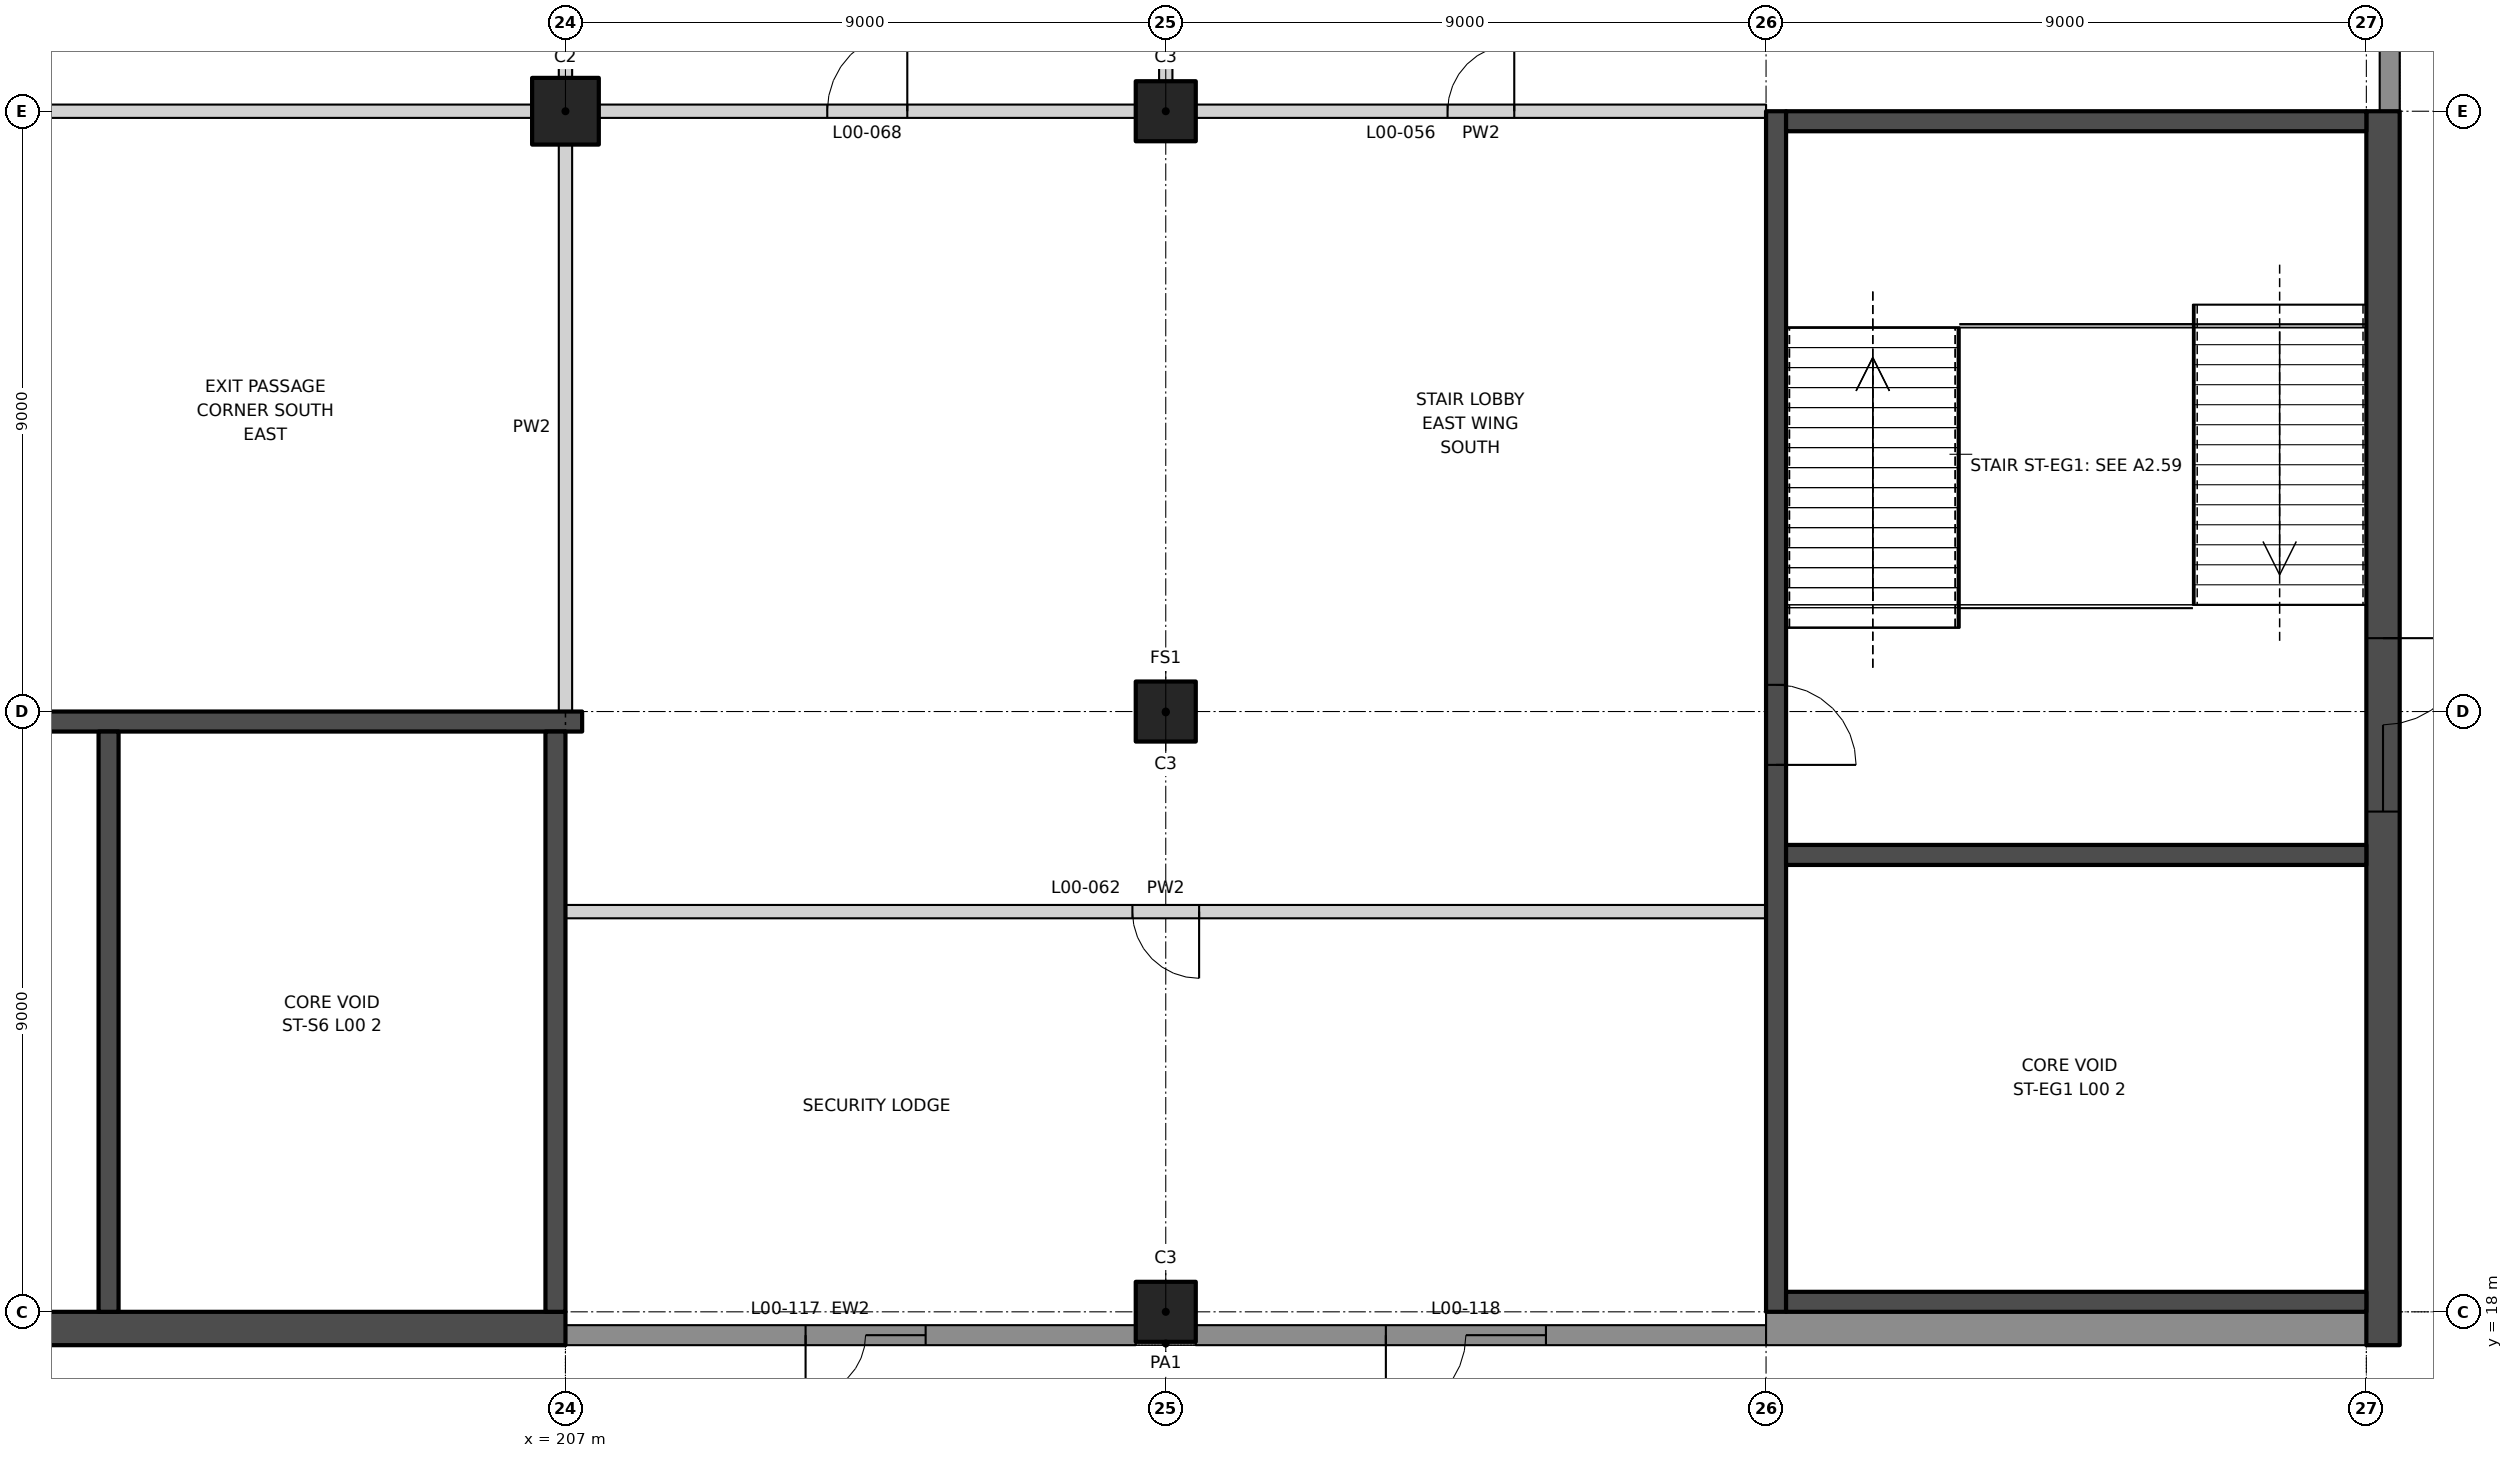
"""IFC4 building model, lengths in metres.
Left out: names, types, materials, properties, quantities, classifications, styles, units other than length and angle.
Written with IfcOpenShell. Run it as: python <this file> out.ifc"""

import sys

from ifc_helpers import new_model, si_unit, direction, frame, frame_2d, origin, origin_2d, place, context, subcontext, project, spatial, rectangle, extrude, element, fill, save


model = new_model("IFC4")
c1 = context("Model", 3, precision=1e-05, world=origin(), true_north=direction((0.0, 1.0)))
c2 = subcontext(c1, "Body", "Model", "MODEL_VIEW")
j1 = project(units=[si_unit("LENGTHUNIT", "METRE"), si_unit("PLANEANGLEUNIT", "RADIAN")], contexts=[c1])
p1 = place(None, origin())
s1 = spatial("IfcSite", under=j1, at=p1, CompositionType="ELEMENT")
p2 = place(p1, origin())
s2 = spatial("IfcBuilding", under=s1, at=p2, CompositionType="ELEMENT")
p3 = place(p2, origin())
s3 = spatial("IfcBuildingStorey", under=s2, at=p3, CompositionType="ELEMENT", Elevation=0.0)
p4 = place(p3, frame((207.0, 36.0, 0.0), z_axis=(0.0, 0.0, 1.0), x_axis=(1.0, 0.0, 0.0)))
e1 = element("IfcColumn", 1, at=p4, inside=s3, PredefinedType="COLUMN", context=c2, shape_type="SweptSolid", body=[
    extrude(rectangle(XDim=1.0, YDim=1.0, at=origin_2d()), origin(), (0.0, 0.0, 1.0), 7.0),
])
for number, where, z_axis, x_axis in (
    (2, (216.0, 18.0, 0.0), (0.0, 0.0, 1.0), (1.0, 0.0, 0.0)),
    (3, (216.0, 27.0, 0.0), (0.0, 0.0, 1.0), (1.0, 0.0, 0.0)),
    (4, (216.0, 36.0, 0.0), (0.0, 0.0, 1.0), (1.0, 0.0, 0.0)),
):
    element("IfcColumn", number, at=place(p3, frame(where, z_axis=z_axis, x_axis=x_axis)), inside=s3, PredefinedType="COLUMN", context=c2, shape_type="SweptSolid", body=[
        extrude(rectangle(XDim=0.9, YDim=0.9, at=origin_2d()), origin(), (0.0, 0.0, 1.0), 7.0),
    ])
p5 = place(p3, frame((207.0, 24.0, 0.0), z_axis=(0.0, 0.0, 1.0), x_axis=(1.0, 0.0, 0.0)))
e5 = element("IfcWall", 5, at=p5, inside=s3, PredefinedType="PARTITIONING", context=c2, shape_type="SweptSolid", body=[
    extrude(rectangle(XDim=18.0, YDim=0.2, at=frame_2d((9.0, 0.0))), origin(), (0.0, 0.0, 1.0), 7.0),
])
p6 = place(p5, frame((8.5, 0.0, 0.0)))
e6 = element("IfcOpeningElement", 6, at=p6, cuts=e5, PredefinedType="OPENING", context=c2, shape_type="SweptSolid", body=[
    extrude(rectangle(XDim=1.0, YDim=2.1, at=frame_2d((0.5, 1.05))), frame((0.0, 0.11, 0.0), z_axis=(0.0, -1.0, 0.0), x_axis=(1.0, 0.0, 0.0)), (0.0, 0.0, 1.0), 0.22),
])
p7 = place(p3, frame((198.45, 36.0, 0.0), z_axis=(0.0, 0.0, 1.0), x_axis=(1.0, 0.0, 0.0)))
e7 = element("IfcWall", 7, at=p7, inside=s3, PredefinedType="PARTITIONING", context=c2, shape_type="SweptSolid", body=[
    extrude(rectangle(XDim=8.05, YDim=0.2, at=frame_2d((4.025, 0.0))), origin(), (0.0, 0.0, 1.0), 5.75),
])
p8 = place(p3, frame((207.5, 36.0, 0.0), z_axis=(0.0, 0.0, 1.0), x_axis=(1.0, 0.0, 0.0)))
e8 = element("IfcWall", 8, at=p8, inside=s3, PredefinedType="PARTITIONING", context=c2, shape_type="SweptSolid", body=[
    extrude(rectangle(XDim=8.05, YDim=0.2, at=frame_2d((4.025, 0.0))), origin(), (0.0, 0.0, 1.0), 5.75),
])
p9 = place(p8, frame((3.425, 0.0, 0.0)))
e9 = element("IfcOpeningElement", 9, at=p9, cuts=e8, PredefinedType="OPENING", context=c2, shape_type="SweptSolid", body=[
    extrude(rectangle(XDim=1.2, YDim=2.1, at=frame_2d((0.6, 1.05))), frame((0.0, 0.11, 0.0), z_axis=(0.0, -1.0, 0.0), x_axis=(1.0, 0.0, 0.0)), (0.0, 0.0, 1.0), 0.22),
])
p10 = place(p3, frame((216.45, 36.0, 0.0), z_axis=(0.0, 0.0, 1.0), x_axis=(1.0, 0.0, 0.0)))
e10 = element("IfcWall", 10, at=p10, inside=s3, PredefinedType="PARTITIONING", context=c2, shape_type="SweptSolid", body=[
    extrude(rectangle(XDim=8.55, YDim=0.2, at=frame_2d((4.275, 0.0))), origin(), (0.0, 0.0, 1.0), 5.75),
])
p11 = place(p10, frame((3.775, 0.0, 0.0)))
e11 = element("IfcOpeningElement", 11, at=p11, cuts=e10, PredefinedType="OPENING", context=c2, shape_type="SweptSolid", body=[
    extrude(rectangle(XDim=1.0, YDim=2.1, at=frame_2d((0.5, 1.05))), frame((0.0, 0.11, 0.0), z_axis=(0.0, -1.0, 0.0), x_axis=(1.0, 0.0, 0.0)), (0.0, 0.0, 1.0), 0.22),
])
p12 = place(p3, frame((207.0, 27.0, 0.0), z_axis=(0.0, 0.0, 1.0), x_axis=(0.0, 1.0, 0.0)))
e12 = element("IfcWall", 12, at=p12, inside=s3, PredefinedType="PARTITIONING", context=c2, shape_type="SweptSolid", body=[
    extrude(rectangle(XDim=8.5, YDim=0.2, at=frame_2d((4.25, 0.0))), origin(), (0.0, 0.0, 1.0), 5.75),
])
p13 = place(p3, frame((207.0, 36.5, 0.0), z_axis=(0.0, 0.0, 1.0), x_axis=(0.0, 1.0, 0.0)))
e13 = element("IfcWall", 13, at=p13, inside=s3, PredefinedType="PARTITIONING", context=c2, shape_type="SweptSolid", body=[
    extrude(rectangle(XDim=8.0, YDim=0.2, at=frame_2d((4.0, 0.0))), origin(), (0.0, 0.0, 1.0), 5.75),
])
p14 = place(p3, frame((216.0, 36.45, 0.0), z_axis=(0.0, 0.0, 1.0), x_axis=(0.0, 1.0, 0.0)))
e14 = element("IfcWall", 14, at=p14, inside=s3, PredefinedType="PARTITIONING", context=c2, shape_type="SweptSolid", body=[
    extrude(rectangle(XDim=8.1, YDim=0.2, at=frame_2d((4.05, 0.0))), origin(), (0.0, 0.0, 1.0), 5.75),
])
p15 = place(p3, frame((207.0, 17.65, 0.0), z_axis=(0.0, 0.0, 1.0), x_axis=(1.0, 0.0, 0.0)))
e15 = element("IfcWall", 15, at=p15, inside=s3, PredefinedType="SOLIDWALL", context=c2, shape_type="SweptSolid", body=[
    extrude(rectangle(XDim=8.55, YDim=0.3, at=frame_2d((4.275, 0.0))), origin(), (0.0, 0.0, 1.0), 7.0),
])
p16 = place(p15, frame((3.6, 0.0, 0.0)))
e16 = element("IfcOpeningElement", 16, at=p16, cuts=e15, PredefinedType="OPENING", context=c2, shape_type="SweptSolid", body=[
    extrude(rectangle(XDim=1.8, YDim=2.4, at=frame_2d((0.9, 1.2))), frame((0.0, 0.16, 0.0), z_axis=(0.0, -1.0, 0.0), x_axis=(1.0, 0.0, 0.0)), (0.0, 0.0, 1.0), 0.32),
])
p17 = place(p3, frame((216.45, 17.65, 0.0), z_axis=(0.0, 0.0, 1.0), x_axis=(1.0, 0.0, 0.0)))
e17 = element("IfcWall", 17, at=p17, inside=s3, PredefinedType="SOLIDWALL", context=c2, shape_type="SweptSolid", body=[
    extrude(rectangle(XDim=8.55, YDim=0.3, at=frame_2d((4.275, 0.0))), origin(), (0.0, 0.0, 1.0), 7.0),
])
p18 = place(p17, frame((2.85, 0.0, 0.0)))
e18 = element("IfcOpeningElement", 18, at=p18, cuts=e17, PredefinedType="OPENING", context=c2, shape_type="SweptSolid", body=[
    extrude(rectangle(XDim=2.4, YDim=2.4, at=frame_2d((1.2, 1.2))), frame((0.0, 0.16, 0.0), z_axis=(0.0, -1.0, 0.0), x_axis=(1.0, 0.0, 0.0)), (0.0, 0.0, 1.0), 0.32),
])
p19 = place(p3, frame((225.0, 17.75, 0.0), z_axis=(0.0, 0.0, 1.0), x_axis=(1.0, 0.0, 0.0)))
e19 = element("IfcWall", 19, at=p19, inside=s3, PredefinedType="SOLIDWALL", context=c2, shape_type="SweptSolid", body=[
    extrude(rectangle(XDim=9.0, YDim=0.5, at=frame_2d((4.5, 0.0))), origin(), (0.0, 0.0, 1.0), 7.0),
])
p20 = place(p3, frame((234.35, 36.0, 0.0), z_axis=(0.0, 0.0, 1.0), x_axis=(0.0, 1.0, 0.0)))
e20 = element("IfcWall", 20, at=p20, inside=s3, PredefinedType="SOLIDWALL", context=c2, shape_type="SweptSolid", body=[
    extrude(rectangle(XDim=8.55, YDim=0.3, at=frame_2d((4.275, 0.0))), origin(), (0.0, 0.0, 1.0), 7.0),
])
p21 = place(p20, frame((3.3, 0.0, 0.0)))
e21 = element("IfcOpeningElement", 21, at=p21, cuts=e20, PredefinedType="OPENING", context=c2, shape_type="SweptSolid", body=[
    extrude(rectangle(XDim=2.4, YDim=2.4, at=frame_2d((1.2, 1.2))), frame((0.0, 0.16, 0.0), z_axis=(0.0, -1.0, 0.0), x_axis=(1.0, 0.0, 0.0)), (0.0, 0.0, 1.0), 0.32),
])
p22 = place(p3, frame((189.0, 26.85, 0.0), z_axis=(0.0, 0.0, 1.0), x_axis=(1.0, 0.0, 0.0)))
e22 = element("IfcWall", 22, at=p22, inside=s3, PredefinedType="SHEAR", context=c2, shape_type="SweptSolid", body=[
    extrude(rectangle(XDim=18.25, YDim=0.3, at=frame_2d((9.125, 0.0))), origin(), (0.0, 0.0, 1.0), 7.0),
])
p23 = place(p22, frame((1.5, 0.0, 0.0)))
e23 = element("IfcOpeningElement", 23, at=p23, cuts=e22, PredefinedType="OPENING", context=c2, shape_type="SweptSolid", body=[
    extrude(rectangle(XDim=1.2, YDim=2.1, at=frame_2d((0.6, 1.05))), frame((0.0, 0.16, 0.0), z_axis=(0.0, -1.0, 0.0), x_axis=(1.0, 0.0, 0.0)), (0.0, 0.0, 1.0), 0.32),
])
p24 = place(p3, frame((189.0, 17.75, 0.0), z_axis=(0.0, 0.0, 1.0), x_axis=(1.0, 0.0, 0.0)))
e24 = element("IfcWall", 24, at=p24, inside=s3, PredefinedType="SHEAR", context=c2, shape_type="SweptSolid", body=[
    extrude(rectangle(XDim=18.0, YDim=0.5, at=frame_2d((9.0, 0.0))), origin(), (0.0, 0.0, 1.0), 7.0),
])
p25 = place(p24, frame((0.8, 0.0, 0.0)))
e25 = element("IfcOpeningElement", 25, at=p25, cuts=e24, PredefinedType="OPENING", context=c2, shape_type="SweptSolid", body=[
    extrude(rectangle(XDim=2.6, YDim=2.4, at=frame_2d((1.3, 1.2))), frame((0.0, 0.26, 0.0), z_axis=(0.0, -1.0, 0.0), x_axis=(1.0, 0.0, 0.0)), (0.0, 0.0, 1.0), 0.52),
])
for number, where, z_axis, x_axis in (
    (26, (206.85, 26.7, 0.0), (0.0, 0.0, 1.0), (0.0, -1.0, 0.0)),
    (27, (200.15, 26.7, 0.0), (0.0, 0.0, 1.0), (0.0, -1.0, 0.0)),
):
    element("IfcWall", number, at=place(p3, frame(where, z_axis=z_axis, x_axis=x_axis)), inside=s3, PredefinedType="SHEAR", context=c2, shape_type="SweptSolid", body=[
        extrude(rectangle(XDim=8.7, YDim=0.3, at=frame_2d((4.35, 0.0))), origin(), (0.0, 0.0, 1.0), 7.0),
    ])
p26 = place(p3, frame((225.15, 36.0, 0.0), z_axis=(0.0, 0.0, 1.0), x_axis=(0.0, -1.0, 0.0)))
e28 = element("IfcWall", 28, at=p26, inside=s3, PredefinedType="SHEAR", context=c2, shape_type="SweptSolid", body=[
    extrude(rectangle(XDim=18.0, YDim=0.3, at=frame_2d((9.0, 0.0))), origin(), (0.0, 0.0, 1.0), 7.0),
])
p27 = place(p26, frame((8.6, 0.0, 0.0)))
e29 = element("IfcOpeningElement", 29, at=p27, cuts=e28, PredefinedType="OPENING", context=c2, shape_type="SweptSolid", body=[
    extrude(rectangle(XDim=1.2, YDim=2.1, at=frame_2d((0.6, 1.05))), frame((0.0, 0.16, 0.0), z_axis=(0.0, -1.0, 0.0), x_axis=(1.0, 0.0, 0.0)), (0.0, 0.0, 1.0), 0.32),
])
p28 = place(p3, frame((234.25, 36.0, 0.0), z_axis=(0.0, 0.0, 1.0), x_axis=(0.0, -1.0, 0.0)))
e30 = element("IfcWall", 30, at=p28, inside=s3, PredefinedType="SHEAR", context=c2, shape_type="SweptSolid", body=[
    extrude(rectangle(XDim=18.5, YDim=0.5, at=frame_2d((9.25, 0.0))), origin(), (0.0, 0.0, 1.0), 7.0),
])
p29 = place(p28, frame((7.9, 0.0, 0.0)))
e31 = element("IfcOpeningElement", 31, at=p29, cuts=e30, PredefinedType="OPENING", context=c2, shape_type="SweptSolid", body=[
    extrude(rectangle(XDim=2.6, YDim=2.4, at=frame_2d((1.3, 1.2))), frame((0.0, 0.26, 0.0), z_axis=(0.0, -1.0, 0.0), x_axis=(1.0, 0.0, 0.0)), (0.0, 0.0, 1.0), 0.52),
])
for number, where, z_axis, x_axis in (
    (32, (225.3, 35.85, 0.0), (0.0, 0.0, 1.0), (1.0, 0.0, 0.0)),
    (33, (225.3, 18.15, 0.0), (0.0, 0.0, 1.0), (1.0, 0.0, 0.0)),
    (34, (225.3, 24.85, 0.0), (0.0, 0.0, 1.0), (1.0, 0.0, 0.0)),
):
    element("IfcWall", number, at=place(p3, frame(where, z_axis=z_axis, x_axis=x_axis)), inside=s3, PredefinedType="SHEAR", context=c2, shape_type="SweptSolid", body=[
        extrude(rectangle(XDim=8.7, YDim=0.3, at=frame_2d((4.35, 0.0))), origin(), (0.0, 0.0, 1.0), 7.0),
    ])
p30 = place(p11, origin())
e35 = element("IfcDoor", 35, at=p30, inside=s3, OperationType="SINGLE_SWING_RIGHT", PredefinedType="DOOR", context=c2, shape_type="SweptSolid", body=[
    extrude(rectangle(XDim=1.0, YDim=2.1, at=frame_2d((0.5, 1.05))), frame((0.0, 0.025, 0.0), z_axis=(0.0, -1.0, 0.0), x_axis=(1.0, 0.0, 0.0)), (0.0, 0.0, 1.0), 0.05),
])
fill(e11, e35)
p31 = place(p6, frame((1.0, 0.0, 0.0), z_axis=(0.0, 0.0, 1.0), x_axis=(-1.0, 0.0, 0.0)))
e36 = element("IfcDoor", 36, at=p31, inside=s3, OperationType="SINGLE_SWING_LEFT", PredefinedType="DOOR", context=c2, shape_type="SweptSolid", body=[
    extrude(rectangle(XDim=1.0, YDim=2.1, at=frame_2d((0.5, 1.05))), frame((0.0, 0.025, 0.0), z_axis=(0.0, -1.0, 0.0), x_axis=(1.0, 0.0, 0.0)), (0.0, 0.0, 1.0), 0.05),
])
fill(e6, e36)
p32 = place(p9, origin())
e37 = element("IfcDoor", 37, at=p32, inside=s3, OperationType="SINGLE_SWING_RIGHT", PredefinedType="DOOR", context=c2, shape_type="SweptSolid", body=[
    extrude(rectangle(XDim=1.2, YDim=2.1, at=frame_2d((0.6, 1.05))), frame((0.0, 0.025, 0.0), z_axis=(0.0, -1.0, 0.0), x_axis=(1.0, 0.0, 0.0)), (0.0, 0.0, 1.0), 0.05),
])
fill(e9, e37)
p33 = place(p16, frame((1.8, 0.0, 0.0), z_axis=(0.0, 0.0, 1.0), x_axis=(-1.0, 0.0, 0.0)))
e38 = element("IfcDoor", 38, at=p33, inside=s3, OperationType="DOUBLE_DOOR_SINGLE_SWING", PredefinedType="DOOR", context=c2, shape_type="SweptSolid", body=[
    extrude(rectangle(XDim=1.8, YDim=2.4, at=frame_2d((0.9, 1.2))), frame((0.0, 0.025, 0.0), z_axis=(0.0, -1.0, 0.0), x_axis=(1.0, 0.0, 0.0)), (0.0, 0.0, 1.0), 0.05),
])
fill(e16, e38)
p34 = place(p18, frame((2.4, 0.0, 0.0), z_axis=(0.0, 0.0, 1.0), x_axis=(-1.0, 0.0, 0.0)))
e39 = element("IfcDoor", 39, at=p34, inside=s3, OperationType="DOUBLE_DOOR_SINGLE_SWING", PredefinedType="DOOR", context=c2, shape_type="SweptSolid", body=[
    extrude(rectangle(XDim=2.4, YDim=2.4, at=frame_2d((1.2, 1.2))), frame((0.0, 0.025, 0.0), z_axis=(0.0, -1.0, 0.0), x_axis=(1.0, 0.0, 0.0)), (0.0, 0.0, 1.0), 0.05),
])
fill(e18, e39)
p35 = place(p27, origin())
e40 = element("IfcDoor", 40, at=p35, inside=s3, OperationType="SINGLE_SWING_RIGHT", PredefinedType="DOOR", context=c2, shape_type="SweptSolid", body=[
    extrude(rectangle(XDim=1.2, YDim=2.1, at=frame_2d((0.6, 1.05))), frame((0.0, 0.025, 0.0), z_axis=(0.0, -1.0, 0.0), x_axis=(1.0, 0.0, 0.0)), (0.0, 0.0, 1.0), 0.05),
])
fill(e29, e40)
p36 = place(p29, origin())
e41 = element("IfcDoor", 41, at=p36, inside=s3, OperationType="DOUBLE_DOOR_SINGLE_SWING", PredefinedType="DOOR", context=c2, shape_type="SweptSolid", body=[
    extrude(rectangle(XDim=2.6, YDim=2.4, at=frame_2d((1.3, 1.2))), frame((0.0, 0.025, 0.0), z_axis=(0.0, -1.0, 0.0), x_axis=(1.0, 0.0, 0.0)), (0.0, 0.0, 1.0), 0.05),
])
fill(e31, e41)
save(model, sys.argv[1])
